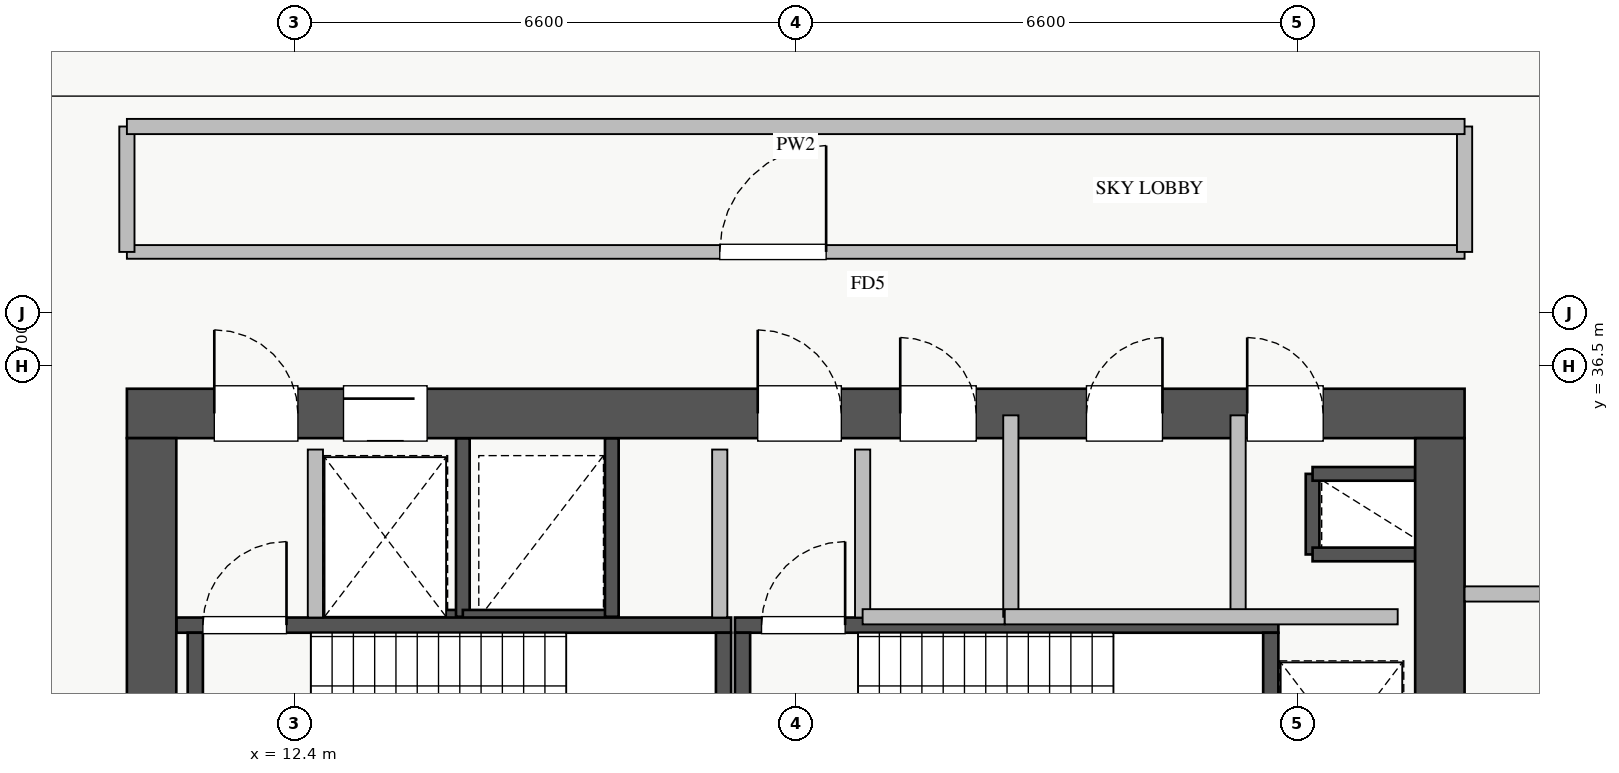
"""IFC4 building model, lengths in metres.
Left out: names, types, materials, properties, quantities, classifications, styles, units other than length and angle.
Written with IfcOpenShell. Run it as: python <this file> out.ifc"""

import sys

from ifc_helpers import new_model, si_unit, direction, frame, frame_2d, origin, place, context, subcontext, project, spatial, rectangle, extrude, source, transform, mapped, element, fill, save


model = new_model("IFC4")
c1 = context("Model", 3, precision=1e-05, world=origin(), true_north=direction((0.0, 1.0)))
c2 = subcontext(c1, "Body", "Model", "MODEL_VIEW")
j1 = project(units=[si_unit("LENGTHUNIT", "METRE"), si_unit("PLANEANGLEUNIT", "RADIAN")], contexts=[c1])
p1 = place(None, origin())
s1 = spatial("IfcSite", under=j1, at=p1, CompositionType="ELEMENT")
p2 = place(p1, origin())
s2 = spatial("IfcBuilding", under=s1, at=p2, CompositionType="ELEMENT")
p3 = place(p2, frame((0.0, 0.0, 186.0)))
s3 = spatial("IfcBuildingStorey", under=s2, at=p3, CompositionType="ELEMENT", Elevation=186.0)
p4 = place(p3, frame((12.68, 33.2, 0.0), z_axis=(0.0, 0.0, 1.0), x_axis=(1.0, 0.0, 0.0)))
e1 = element("IfcWall", 1, at=p4, inside=s3, PredefinedType="SHEAR", context=c2, shape_type="SweptSolid", body=[
    extrude(rectangle(XDim=1.94, YDim=0.18, at=frame_2d((0.97, 0.0))), origin(), (0.0, 0.0, 1.0), 4.32),
])
p5 = place(p3, frame((14.62, 33.2, 0.0), z_axis=(0.0, 0.0, 1.0), x_axis=(0.0, 1.0, 0.0)))
e2 = element("IfcWall", 2, at=p5, inside=s3, PredefinedType="SHEAR", context=c2, shape_type="SweptSolid", body=[
    extrude(rectangle(XDim=2.35, YDim=0.18, at=frame_2d((1.175, 0.0))), origin(), (0.0, 0.0, 1.0), 4.32),
])
p6 = place(p3, frame((25.8, 34.02, 0.0), z_axis=(0.0, 0.0, 1.0), x_axis=(0.0, 1.0, 0.0)))
e3 = element("IfcWall", 3, at=p6, inside=s3, PredefinedType="SHEAR", context=c2, shape_type="SweptSolid", body=[
    extrude(rectangle(XDim=1.06, YDim=0.18, at=frame_2d((0.53, 0.0))), origin(), (0.0, 0.0, 1.0), 4.32),
])
for number, where, z_axis, x_axis in (
    (4, (25.8, 35.08, 0.0), (0.0, 0.0, 1.0), (1.0, 0.0, 0.0)),
    (5, (25.8, 34.02, 0.0), (0.0, 0.0, 1.0), (1.0, 0.0, 0.0)),
):
    element("IfcWall", number, at=place(p3, frame(where, z_axis=z_axis, x_axis=x_axis)), inside=s3, PredefinedType="SHEAR", context=c2, shape_type="SweptSolid", body=[
        extrude(rectangle(XDim=1.35, YDim=0.18, at=frame_2d((0.675, 0.0))), origin(), (0.0, 0.0, 1.0), 4.32),
    ])
p7 = place(p3, frame((14.62, 33.2, 0.0), z_axis=(0.0, 0.0, 1.0), x_axis=(1.0, 0.0, 0.0)))
e6 = element("IfcWall", 6, at=p7, inside=s3, PredefinedType="SHEAR", context=c2, shape_type="SweptSolid", body=[
    extrude(rectangle(XDim=1.96, YDim=0.18, at=frame_2d((0.98, 0.0))), origin(), (0.0, 0.0, 1.0), 4.32),
])
p8 = place(p3, frame((16.58, 33.2, 0.0), z_axis=(0.0, 0.0, 1.0), x_axis=(0.0, 1.0, 0.0)))
e7 = element("IfcWall", 7, at=p8, inside=s3, PredefinedType="SHEAR", context=c2, shape_type="SweptSolid", body=[
    extrude(rectangle(XDim=2.35, YDim=0.18, at=frame_2d((1.175, 0.0))), origin(), (0.0, 0.0, 1.0), 4.32),
])
p9 = place(p3, frame((10.85, 33.09, 0.0), z_axis=(0.0, 0.0, 1.0), x_axis=(1.0, 0.0, 0.0)))
e8 = element("IfcWall", 8, at=p9, inside=s3, PredefinedType="SHEAR", context=c2, shape_type="SweptSolid", body=[
    extrude(rectangle(XDim=7.3, YDim=0.2, at=frame_2d((3.65, 0.0))), origin(), (0.0, 0.0, 1.0), 4.5),
])
p10 = place(p9, frame((0.35, 0.0, 0.0)))
e9 = element("IfcOpeningElement", 9, at=p10, cuts=e8, PredefinedType="OPENING", context=c2, shape_type="SweptSolid", body=[
    extrude(rectangle(XDim=1.1, YDim=2.05, at=frame_2d((0.55, 1.025))), frame((0.0, 0.11, 0.0), z_axis=(0.0, -1.0, 0.0), x_axis=(1.0, 0.0, 0.0)), (0.0, 0.0, 1.0), 0.22),
])
for number, where, z_axis, x_axis in (
    (10, (11.1, 30.05, 0.0), (0.0, 0.0, 1.0), (0.0, 1.0, 0.0)),
    (11, (18.05, 30.05, 0.0), (0.0, 0.0, 1.0), (0.0, 1.0, 0.0)),
):
    element("IfcWall", number, at=place(p3, frame(where, z_axis=z_axis, x_axis=x_axis)), inside=s3, PredefinedType="SHEAR", context=c2, shape_type="SweptSolid", body=[
        extrude(rectangle(XDim=2.94, YDim=0.2, at=frame_2d((1.47, 0.0))), origin(), (0.0, 0.0, 1.0), 4.5),
    ])
p11 = place(p3, frame((18.2, 33.09, 0.0), z_axis=(0.0, 0.0, 1.0), x_axis=(1.0, 0.0, 0.0)))
e12 = element("IfcWall", 12, at=p11, inside=s3, PredefinedType="SHEAR", context=c2, shape_type="SweptSolid", body=[
    extrude(rectangle(XDim=7.15, YDim=0.2, at=frame_2d((3.575, 0.0))), origin(), (0.0, 0.0, 1.0), 4.5),
])
p12 = place(p11, frame((0.35, 0.0, 0.0)))
e13 = element("IfcOpeningElement", 13, at=p12, cuts=e12, PredefinedType="OPENING", context=c2, shape_type="SweptSolid", body=[
    extrude(rectangle(XDim=1.1, YDim=2.05, at=frame_2d((0.55, 1.025))), frame((0.0, 0.11, 0.0), z_axis=(0.0, -1.0, 0.0), x_axis=(1.0, 0.0, 0.0)), (0.0, 0.0, 1.0), 0.22),
])
for number, where, z_axis, x_axis in (
    (14, (18.3, 30.05, 0.0), (0.0, 0.0, 1.0), (0.0, 1.0, 0.0)),
    (15, (25.25, 30.05, 0.0), (0.0, 0.0, 1.0), (0.0, 1.0, 0.0)),
):
    element("IfcWall", number, at=place(p3, frame(where, z_axis=z_axis, x_axis=x_axis)), inside=s3, PredefinedType="SHEAR", context=c2, shape_type="SweptSolid", body=[
        extrude(rectangle(XDim=2.94, YDim=0.2, at=frame_2d((1.47, 0.0))), origin(), (0.0, 0.0, 1.0), 4.5),
    ])
p13 = place(p3, frame((10.2, 35.875, 0.0), z_axis=(0.0, 0.0, 1.0), x_axis=(1.0, 0.0, 0.0)))
e16 = element("IfcWall", 16, at=p13, inside=s3, PredefinedType="SHEAR", context=c2, shape_type="SweptSolid", body=[
    extrude(rectangle(XDim=17.6, YDim=0.65, at=frame_2d((8.8, 0.0))), origin(), (0.0, 0.0, 1.0), 4.5),
])
p14 = place(p13, frame((1.15, 0.0, 0.0)))
e17 = element("IfcOpeningElement", 17, at=p14, cuts=e16, PredefinedType="OPENING", context=c2, shape_type="SweptSolid", body=[
    extrude(rectangle(XDim=1.1, YDim=2.05, at=frame_2d((0.55, 1.025))), frame((0.0, 0.335, 0.0), z_axis=(0.0, -1.0, 0.0), x_axis=(1.0, 0.0, 0.0)), (0.0, 0.0, 1.0), 0.67),
])
p15 = place(p13, frame((8.3, 0.0, 0.0)))
e18 = element("IfcOpeningElement", 18, at=p15, cuts=e16, PredefinedType="OPENING", context=c2, shape_type="SweptSolid", body=[
    extrude(rectangle(XDim=1.1, YDim=2.05, at=frame_2d((0.55, 1.025))), frame((0.0, 0.335, 0.0), z_axis=(0.0, -1.0, 0.0), x_axis=(1.0, 0.0, 0.0)), (0.0, 0.0, 1.0), 0.67),
])
p16 = place(p13, frame((2.85, 0.0, 0.0)))
e19 = element("IfcOpeningElement", 19, at=p16, cuts=e16, PredefinedType="OPENING", context=c2, shape_type="SweptSolid", body=[
    extrude(rectangle(XDim=1.1, YDim=2.05, at=frame_2d((0.55, 1.025))), frame((0.0, 0.335, 0.0), z_axis=(0.0, -1.0, 0.0), x_axis=(1.0, 0.0, 0.0)), (0.0, 0.0, 1.0), 0.67),
])
p17 = place(p13, frame((14.74, 0.0, 0.0)))
e20 = element("IfcOpeningElement", 20, at=p17, cuts=e16, PredefinedType="OPENING", context=c2, shape_type="SweptSolid", body=[
    extrude(rectangle(XDim=1.0, YDim=2.05, at=frame_2d((0.5, 1.025))), frame((0.0, 0.335, 0.0), z_axis=(0.0, -1.0, 0.0), x_axis=(1.0, 0.0, 0.0)), (0.0, 0.0, 1.0), 0.67),
])
p18 = place(p13, frame((10.175, 0.0, 0.0)))
e21 = element("IfcOpeningElement", 21, at=p18, cuts=e16, PredefinedType="OPENING", context=c2, shape_type="SweptSolid", body=[
    extrude(rectangle(XDim=1.0, YDim=2.05, at=frame_2d((0.5, 1.025))), frame((0.0, 0.335, 0.0), z_axis=(0.0, -1.0, 0.0), x_axis=(1.0, 0.0, 0.0)), (0.0, 0.0, 1.0), 0.67),
])
p19 = place(p13, frame((12.625, 0.0, 0.0)))
e22 = element("IfcOpeningElement", 22, at=p19, cuts=e16, PredefinedType="OPENING", context=c2, shape_type="SweptSolid", body=[
    extrude(rectangle(XDim=1.0, YDim=2.05, at=frame_2d((0.5, 1.025))), frame((0.0, 0.335, 0.0), z_axis=(0.0, -1.0, 0.0), x_axis=(1.0, 0.0, 0.0)), (0.0, 0.0, 1.0), 0.67),
])
p20 = place(p3, frame((10.525, 29.65, 0.0), z_axis=(0.0, 0.0, 1.0), x_axis=(0.0, 1.0, 0.0)))
e23 = element("IfcWall", 23, at=p20, inside=s3, PredefinedType="SHEAR", context=c2, shape_type="SweptSolid", body=[
    extrude(rectangle(XDim=5.9, YDim=0.65, at=frame_2d((2.95, 0.0))), origin(), (0.0, 0.0, 1.0), 4.5),
])
p21 = place(p3, frame((27.475, 29.65, 0.0), z_axis=(0.0, 0.0, 1.0), x_axis=(0.0, 1.0, 0.0)))
e24 = element("IfcWall", 24, at=p21, inside=s3, PredefinedType="SHEAR", context=c2, shape_type="SweptSolid", body=[
    extrude(rectangle(XDim=5.9, YDim=0.65, at=frame_2d((2.95, 0.0))), origin(), (0.0, 0.0, 1.0), 4.5),
])
p22 = place(p21, frame((1.1, 0.0, 0.0)))
e25 = element("IfcOpeningElement", 25, at=p22, cuts=e24, PredefinedType="OPENING", context=c2, shape_type="SweptSolid", body=[
    extrude(rectangle(XDim=1.3, YDim=2.05, at=frame_2d((0.65, 1.025))), frame((0.0, 0.335, 0.0), z_axis=(0.0, -1.0, 0.0), x_axis=(1.0, 0.0, 0.0)), (0.0, 0.0, 1.0), 0.67),
])
p23 = place(p3, frame((27.8, 33.5, 0.0), z_axis=(0.0, 0.0, 1.0), x_axis=(1.0, 0.0, 0.0)))
e26 = element("IfcWall", 26, at=p23, inside=s3, PredefinedType="PARTITIONING", context=c2, shape_type="SweptSolid", body=[
    extrude(rectangle(XDim=3.1, YDim=0.2, at=frame_2d((1.55, 0.0))), origin(), (0.0, 0.0, 1.0), 3.465),
])
for number, where, z_axis, x_axis in (
    (27, (12.68, 33.19, 0.0), (0.0, 0.0, 1.0), (0.0, 1.0, 0.0)),
    (28, (18.0, 33.19, 0.0), (0.0, 0.0, 1.0), (0.0, 1.0, 0.0)),
    (29, (19.88, 33.19, 0.0), (0.0, 0.0, 1.0), (0.0, 1.0, 0.0)),
):
    element("IfcWall", number, at=place(p3, frame(where, z_axis=z_axis, x_axis=x_axis)), inside=s3, PredefinedType="PARTITIONING", context=c2, shape_type="SweptSolid", body=[
        extrude(rectangle(XDim=2.21, YDim=0.2, at=frame_2d((1.105, 0.0))), origin(), (0.0, 0.0, 1.0), 4.32),
    ])
p24 = place(p3, frame((24.82, 33.2, 0.0), z_axis=(0.0, 0.0, 1.0), x_axis=(0.0, 1.0, 0.0)))
e30 = element("IfcWall", 30, at=p24, inside=s3, PredefinedType="PARTITIONING", context=c2, shape_type="SweptSolid", body=[
    extrude(rectangle(XDim=2.65, YDim=0.2, at=frame_2d((1.325, 0.0))), origin(), (0.0, 0.0, 1.0), 4.32),
])
p25 = place(p3, frame((19.88, 33.2, 0.0), z_axis=(0.0, 0.0, 1.0), x_axis=(1.0, 0.0, 0.0)))
e31 = element("IfcWall", 31, at=p25, inside=s3, PredefinedType="PARTITIONING", context=c2, shape_type="SweptSolid", body=[
    extrude(rectangle(XDim=1.87, YDim=0.2, at=frame_2d((0.935, 0.0))), origin(), (0.0, 0.0, 1.0), 4.32),
])
p26 = place(p3, frame((21.83, 33.2, 0.0), z_axis=(0.0, 0.0, 1.0), x_axis=(0.0, 1.0, 0.0)))
e32 = element("IfcWall", 32, at=p26, inside=s3, PredefinedType="PARTITIONING", context=c2, shape_type="SweptSolid", body=[
    extrude(rectangle(XDim=2.65, YDim=0.2, at=frame_2d((1.325, 0.0))), origin(), (0.0, 0.0, 1.0), 4.32),
])
p27 = place(p3, frame((21.75, 33.2, 0.0), z_axis=(0.0, 0.0, 1.0), x_axis=(1.0, 0.0, 0.0)))
e33 = element("IfcWall", 33, at=p27, inside=s3, PredefinedType="PARTITIONING", context=c2, shape_type="SweptSolid", body=[
    extrude(rectangle(XDim=5.17, YDim=0.2, at=frame_2d((2.585, 0.0))), origin(), (0.0, 0.0, 1.0), 4.32),
])
p28 = place(p3, frame((10.2, 38.0, 0.0), z_axis=(0.0, 0.0, 1.0), x_axis=(1.0, 0.0, 0.0)))
e34 = element("IfcWall", 34, at=p28, inside=s3, PredefinedType="PARTITIONING", context=c2, shape_type="SweptSolid", body=[
    extrude(rectangle(XDim=17.6, YDim=0.18, at=frame_2d((8.8, 0.0))), origin(), (0.0, 0.0, 1.0), 4.32),
])
p29 = place(p28, frame((7.8, 0.0, 0.0)))
e35 = element("IfcOpeningElement", 35, at=p29, cuts=e34, PredefinedType="OPENING", context=c2, shape_type="SweptSolid", body=[
    extrude(rectangle(XDim=1.4, YDim=2.05, at=frame_2d((0.7, 1.025))), frame((0.0, 0.1, 0.0), z_axis=(0.0, -1.0, 0.0), x_axis=(1.0, 0.0, 0.0)), (0.0, 0.0, 1.0), 0.2),
])
for number, where, z_axis, x_axis in (
    (36, (10.2, 38.0, 0.0), (0.0, 0.0, 1.0), (0.0, 1.0, 0.0)),
    (37, (27.8, 38.0, 0.0), (0.0, 0.0, 1.0), (0.0, 1.0, 0.0)),
):
    element("IfcWall", number, at=place(p3, frame(where, z_axis=z_axis, x_axis=x_axis)), inside=s3, PredefinedType="PARTITIONING", context=c2, shape_type="SweptSolid", body=[
        extrude(rectangle(XDim=1.65, YDim=0.2, at=frame_2d((0.825, 0.0))), origin(), (0.0, 0.0, 1.0), 4.32),
    ])
p30 = place(p3, frame((10.2, 39.65, 0.0), z_axis=(0.0, 0.0, 1.0), x_axis=(1.0, 0.0, 0.0)))
e38 = element("IfcWall", 38, at=p30, inside=s3, PredefinedType="PARTITIONING", context=c2, shape_type="SweptSolid", body=[
    extrude(rectangle(XDim=17.6, YDim=0.2, at=frame_2d((8.8, 0.0))), origin(), (0.0, 0.0, 1.0), 1.915),
])
m1 = source(origin(), c2, "Body", "SweptSolid", [
    extrude(rectangle(XDim=1.1, YDim=2.05, at=frame_2d((0.55, 1.025))), frame((0.0, 0.025, 0.0), z_axis=(0.0, -1.0, 0.0), x_axis=(1.0, 0.0, 0.0)), (0.0, 0.0, 1.0), 0.05),
])
p31 = place(p14, origin())
e39 = element("IfcDoor", 39, at=p31, inside=s3, OperationType="SINGLE_SWING_LEFT", PredefinedType="DOOR", context=c2, shape_type="MappedRepresentation", body=[
    mapped(m1, transform((0.0, 0.0, 0.0), x_axis=(1.0, 0.0, 0.0), y_axis=(0.0, 1.0, 0.0), z_axis=(0.0, 0.0, 1.0), scale=1.0)),
])
fill(e17, e39)
p32 = place(p10, origin())
e40 = element("IfcDoor", 40, at=p32, inside=s3, OperationType="SINGLE_SWING_RIGHT", PredefinedType="DOOR", context=c2, shape_type="MappedRepresentation", body=[
    mapped(m1, transform((0.0, 0.0, 0.0), x_axis=(1.0, 0.0, 0.0), y_axis=(0.0, 1.0, 0.0), z_axis=(0.0, 0.0, 1.0), scale=1.0)),
])
fill(e9, e40)
p33 = place(p15, origin())
e41 = element("IfcDoor", 41, at=p33, inside=s3, OperationType="SINGLE_SWING_LEFT", PredefinedType="DOOR", context=c2, shape_type="MappedRepresentation", body=[
    mapped(m1, transform((0.0, 0.0, 0.0), x_axis=(1.0, 0.0, 0.0), y_axis=(0.0, 1.0, 0.0), z_axis=(0.0, 0.0, 1.0), scale=1.0)),
])
fill(e18, e41)
p34 = place(p12, origin())
e42 = element("IfcDoor", 42, at=p34, inside=s3, OperationType="SINGLE_SWING_RIGHT", PredefinedType="DOOR", context=c2, shape_type="MappedRepresentation", body=[
    mapped(m1, transform((0.0, 0.0, 0.0), x_axis=(1.0, 0.0, 0.0), y_axis=(0.0, 1.0, 0.0), z_axis=(0.0, 0.0, 1.0), scale=1.0)),
])
fill(e13, e42)
p35 = place(p16, origin())
e43 = element("IfcDoor", 43, at=p35, inside=s3, OperationType="SLIDING_TO_LEFT", PredefinedType="DOOR", context=c2, shape_type="MappedRepresentation", body=[
    mapped(m1, transform((0.0, 0.0, 0.0), x_axis=(1.0, 0.0, 0.0), y_axis=(0.0, 1.0, 0.0), z_axis=(0.0, 0.0, 1.0), scale=1.0)),
])
fill(e19, e43)
m2 = source(origin(), c2, "Body", "SweptSolid", [
    extrude(rectangle(XDim=1.0, YDim=2.05, at=frame_2d((0.5, 1.025))), frame((0.0, 0.025, 0.0), z_axis=(0.0, -1.0, 0.0), x_axis=(1.0, 0.0, 0.0)), (0.0, 0.0, 1.0), 0.05),
])
p36 = place(p17, origin())
e44 = element("IfcDoor", 44, at=p36, inside=s3, OperationType="SINGLE_SWING_LEFT", PredefinedType="DOOR", context=c2, shape_type="MappedRepresentation", body=[
    mapped(m2, transform((0.0, 0.0, 0.0), x_axis=(1.0, 0.0, 0.0), y_axis=(0.0, 1.0, 0.0), z_axis=(0.0, 0.0, 1.0), scale=1.0)),
])
fill(e20, e44)
p37 = place(p18, origin())
e45 = element("IfcDoor", 45, at=p37, inside=s3, OperationType="SINGLE_SWING_LEFT", PredefinedType="DOOR", context=c2, shape_type="MappedRepresentation", body=[
    mapped(m2, transform((0.0, 0.0, 0.0), x_axis=(1.0, 0.0, 0.0), y_axis=(0.0, 1.0, 0.0), z_axis=(0.0, 0.0, 1.0), scale=1.0)),
])
fill(e21, e45)
p38 = place(p19, origin())
e46 = element("IfcDoor", 46, at=p38, inside=s3, OperationType="SINGLE_SWING_RIGHT", PredefinedType="DOOR", context=c2, shape_type="MappedRepresentation", body=[
    mapped(m2, transform((0.0, 0.0, 0.0), x_axis=(1.0, 0.0, 0.0), y_axis=(0.0, 1.0, 0.0), z_axis=(0.0, 0.0, 1.0), scale=1.0)),
])
fill(e22, e46)
m3 = source(origin(), c2, "Body", "SweptSolid", [
    extrude(rectangle(XDim=1.4, YDim=2.05, at=frame_2d((0.7, 1.025))), frame((0.0, 0.025, 0.0), z_axis=(0.0, -1.0, 0.0), x_axis=(1.0, 0.0, 0.0)), (0.0, 0.0, 1.0), 0.05),
])
p39 = place(p29, origin())
e47 = element("IfcDoor", 47, at=p39, inside=s3, OperationType="SINGLE_SWING_RIGHT", PredefinedType="DOOR", context=c2, shape_type="MappedRepresentation", body=[
    mapped(m3, transform((0.0, 0.0, 0.0), x_axis=(1.0, 0.0, 0.0), y_axis=(0.0, 1.0, 0.0), z_axis=(0.0, 0.0, 1.0), scale=1.0)),
])
fill(e35, e47)
save(model, sys.argv[1])
